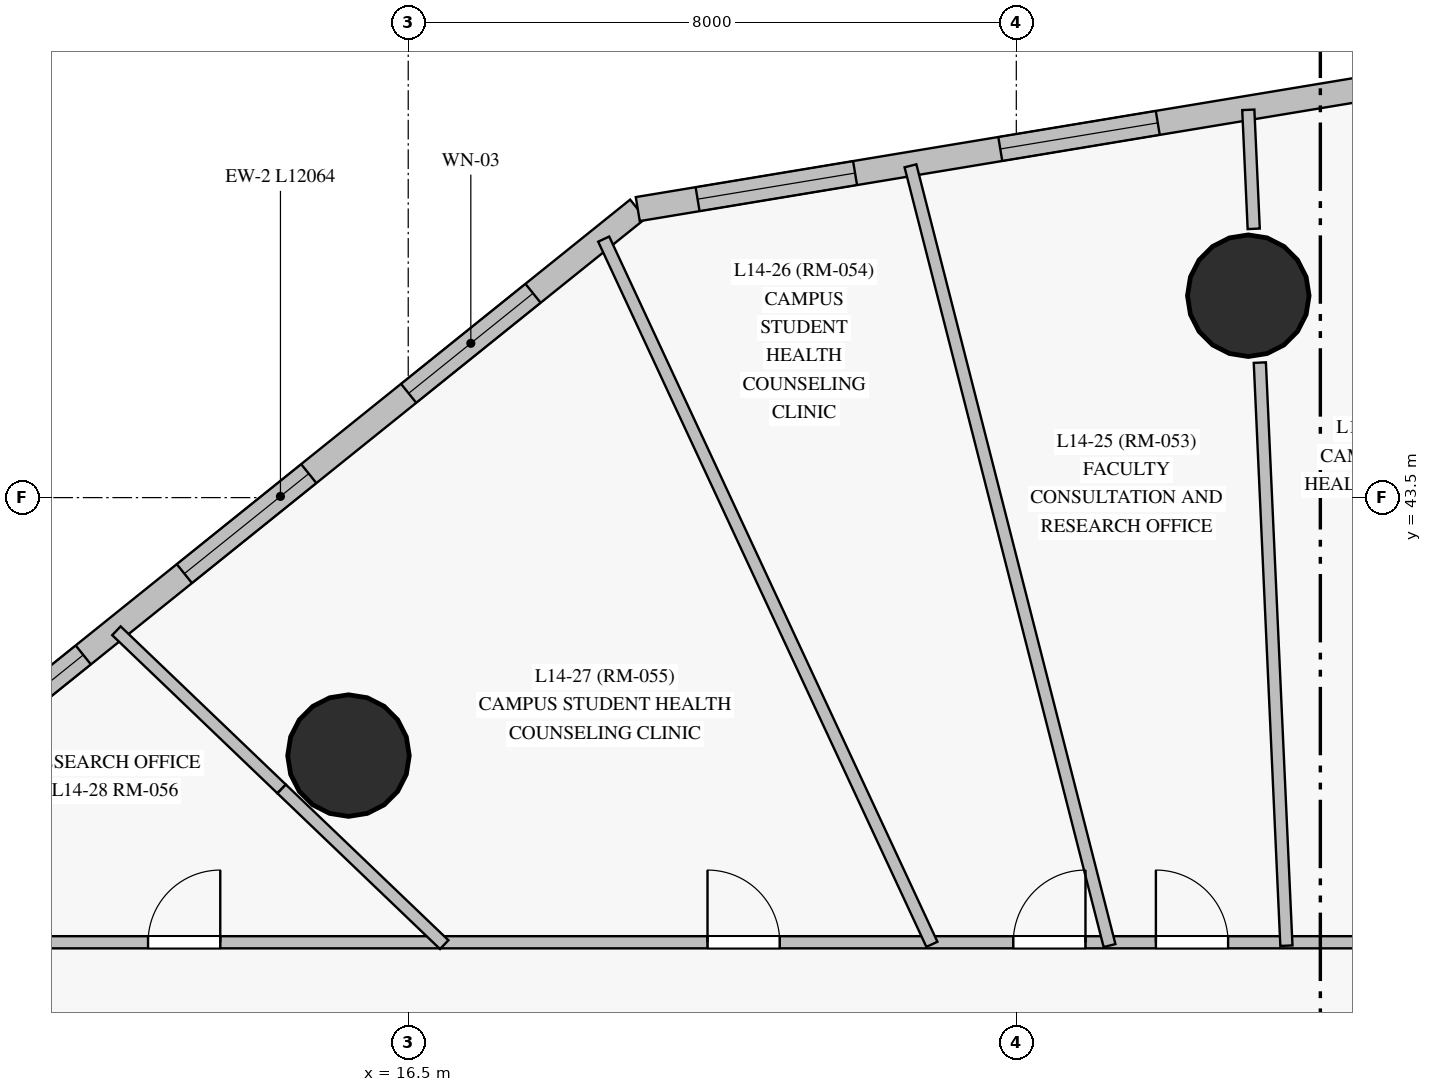
"""IFC4 building model, lengths in metres.
Left out: names, types, materials, properties, quantities, classifications, styles, units other than length and angle.
Written with IfcOpenShell. Run it as: python <this file> out.ifc"""

import sys

from ifc_helpers import new_model, si_unit, direction, frame, frame_2d, origin, origin_with_axes, origin_2d, place, context, subcontext, project, spatial, rectangle, circle, extrude, source, transform, mapped, element, fill, save


model = new_model("IFC4")
c1 = context("Model", 3, precision=1e-05, world=origin(), true_north=direction((0.0, 1.0)))
c2 = subcontext(c1, "Body", "Model", "MODEL_VIEW")
j1 = project(units=[si_unit("LENGTHUNIT", "METRE"), si_unit("PLANEANGLEUNIT", "RADIAN")], contexts=[c1])
p1 = place(None, origin())
s1 = spatial("IfcSite", under=j1, at=p1, CompositionType="ELEMENT")
p2 = place(p1, origin())
s2 = spatial("IfcBuilding", under=s1, at=p2, CompositionType="ELEMENT")
p3 = place(p2, frame((0.0, 0.0, 55.3)))
s3 = spatial("IfcBuildingStorey", under=s2, at=p3, CompositionType="ELEMENT", Elevation=55.3)
m1 = source(origin_with_axes(), c2, "Body", "SweptSolid", [
    extrude(circle(Radius=0.8, at=origin_2d()), origin(), (0.0, 0.0, 1.0), 3.6),
])
for number, where, z_axis, x_axis in (
    (1, (27.552, 46.156, 0.0), (0.0, 0.0, 1.0), (1.0, 0.0, 0.0)),
    (2, (15.714, 40.106, 0.0), (0.0, 0.0, 1.0), (1.0, 0.0, 0.0)),
):
    element("IfcColumn", number, at=place(p3, frame(where, z_axis=z_axis, x_axis=x_axis)), inside=s3, PredefinedType="COLUMN", context=c2, shape_type="MappedRepresentation", body=[
        mapped(m1, transform((0.0, 0.0, 0.0), scale=1.0)),
    ])
p4 = place(p3, frame((19.52, 47.296, 0.0), z_axis=(0.0, 0.0, 1.0), x_axis=(-0.779334397084, -0.626608248846, 0.0)))
e3 = element("IfcWall", 3, at=p4, inside=s3, PredefinedType="SOLIDWALL", context=c2, shape_type="SweptSolid", body=[
    extrude(rectangle(XDim=12.064, YDim=0.32, at=frame_2d((6.032, 0.0))), origin(), (0.0, 0.0, 1.0), 3.35),
])
p5 = place(p4, frame((1.768, 0.0, 0.85)))
e4 = element("IfcOpeningElement", 4, at=p5, cuts=e3, PredefinedType="OPENING", context=c2, shape_type="SweptSolid", body=[
    extrude(rectangle(XDim=2.1, YDim=1.95, at=frame_2d((1.05, 0.975))), frame((0.0, 0.17, 0.0), z_axis=(0.0, -1.0, 0.0), x_axis=(1.0, 0.0, 0.0)), (0.0, 0.0, 1.0), 0.34),
])
p6 = place(p4, frame((5.554, 0.0, 0.85)))
e5 = element("IfcOpeningElement", 5, at=p6, cuts=e3, PredefinedType="OPENING", context=c2, shape_type="SweptSolid", body=[
    extrude(rectangle(XDim=2.1, YDim=1.95, at=frame_2d((1.05, 0.975))), frame((0.0, 0.17, 0.0), z_axis=(0.0, -1.0, 0.0), x_axis=(1.0, 0.0, 0.0)), (0.0, 0.0, 1.0), 0.34),
])
p7 = place(p4, frame((9.361, 0.0, 0.85)))
e6 = element("IfcOpeningElement", 6, at=p7, cuts=e3, PredefinedType="OPENING", context=c2, shape_type="SweptSolid", body=[
    extrude(rectangle(XDim=2.1, YDim=1.95, at=frame_2d((1.05, 0.975))), frame((0.0, 0.17, 0.0), z_axis=(0.0, -1.0, 0.0), x_axis=(1.0, 0.0, 0.0)), (0.0, 0.0, 1.0), 0.34),
])
p8 = place(p3, frame((34.342, 49.753, 0.0), z_axis=(0.0, 0.0, 1.0), x_axis=(-0.986534972803, -0.163550443096, 0.0)))
e7 = element("IfcWall", 7, at=p8, inside=s3, PredefinedType="SOLIDWALL", context=c2, shape_type="SweptSolid", body=[
    extrude(rectangle(XDim=15.025, YDim=0.32, at=frame_2d((7.512, 0.0))), origin(), (0.0, 0.0, 1.0), 3.35),
])
p9 = place(p8, frame((3.28, 0.0, 0.85)))
e8 = element("IfcOpeningElement", 8, at=p9, cuts=e7, PredefinedType="OPENING", context=c2, shape_type="SweptSolid", body=[
    extrude(rectangle(XDim=2.1, YDim=1.95, at=frame_2d((1.05, 0.975))), frame((0.0, 0.17, 0.0), z_axis=(0.0, -1.0, 0.0), x_axis=(1.0, 0.0, 0.0)), (0.0, 0.0, 1.0), 0.34),
])
p10 = place(p8, frame((8.09, 0.0, 0.85)))
e9 = element("IfcOpeningElement", 9, at=p10, cuts=e7, PredefinedType="OPENING", context=c2, shape_type="SweptSolid", body=[
    extrude(rectangle(XDim=2.1, YDim=1.95, at=frame_2d((1.05, 0.975))), frame((0.0, 0.17, 0.0), z_axis=(0.0, -1.0, 0.0), x_axis=(1.0, 0.0, 0.0)), (0.0, 0.0, 1.0), 0.34),
])
p11 = place(p8, frame((12.127, 0.0, 0.85)))
e10 = element("IfcOpeningElement", 10, at=p11, cuts=e7, PredefinedType="OPENING", context=c2, shape_type="SweptSolid", body=[
    extrude(rectangle(XDim=2.1, YDim=1.95, at=frame_2d((1.05, 0.975))), frame((0.0, 0.17, 0.0), z_axis=(0.0, -1.0, 0.0), x_axis=(1.0, 0.0, 0.0)), (0.0, 0.0, 1.0), 0.34),
])
p12 = place(p3, frame((10.5, 37.65, 0.0), z_axis=(0.0, 0.0, 1.0), x_axis=(1.0, 0.0, 0.0)))
e11 = element("IfcWall", 11, at=p12, inside=s3, PredefinedType="PARTITIONING", context=c2, shape_type="SweptSolid", body=[
    extrude(rectangle(XDim=29.75, YDim=0.16, at=frame_2d((14.875, 0.0))), origin(), (0.0, 0.0, 1.0), 2.75),
])
p13 = place(p12, frame((26.502, 0.0, 0.0)))
e12 = element("IfcOpeningElement", 12, at=p13, cuts=e11, PredefinedType="OPENING", context=c2, shape_type="SweptSolid", body=[
    extrude(rectangle(XDim=0.95, YDim=2.15, at=frame_2d((0.475, 1.075))), frame((0.0, 0.09, 0.0), z_axis=(0.0, -1.0, 0.0), x_axis=(1.0, 0.0, 0.0)), (0.0, 0.0, 1.0), 0.18),
])
p14 = place(p12, frame((24.014, 0.0, 0.0)))
e13 = element("IfcOpeningElement", 13, at=p14, cuts=e11, PredefinedType="OPENING", context=c2, shape_type="SweptSolid", body=[
    extrude(rectangle(XDim=0.95, YDim=2.15, at=frame_2d((0.475, 1.075))), frame((0.0, 0.09, 0.0), z_axis=(0.0, -1.0, 0.0), x_axis=(1.0, 0.0, 0.0)), (0.0, 0.0, 1.0), 0.18),
])
p15 = place(p12, frame((21.837, 0.0, 0.0)))
e14 = element("IfcOpeningElement", 14, at=p15, cuts=e11, PredefinedType="OPENING", context=c2, shape_type="SweptSolid", body=[
    extrude(rectangle(XDim=0.95, YDim=2.15, at=frame_2d((0.475, 1.075))), frame((0.0, 0.09, 0.0), z_axis=(0.0, -1.0, 0.0), x_axis=(1.0, 0.0, 0.0)), (0.0, 0.0, 1.0), 0.18),
])
p16 = place(p12, frame((18.823, 0.0, 0.0)))
e15 = element("IfcOpeningElement", 15, at=p16, cuts=e11, PredefinedType="OPENING", context=c2, shape_type="SweptSolid", body=[
    extrude(rectangle(XDim=0.95, YDim=2.15, at=frame_2d((0.475, 1.075))), frame((0.0, 0.09, 0.0), z_axis=(0.0, -1.0, 0.0), x_axis=(1.0, 0.0, 0.0)), (0.0, 0.0, 1.0), 0.18),
])
p17 = place(p12, frame((15.836, 0.0, 0.0)))
e16 = element("IfcOpeningElement", 16, at=p17, cuts=e11, PredefinedType="OPENING", context=c2, shape_type="SweptSolid", body=[
    extrude(rectangle(XDim=0.95, YDim=2.15, at=frame_2d((0.475, 1.075))), frame((0.0, 0.09, 0.0), z_axis=(0.0, -1.0, 0.0), x_axis=(1.0, 0.0, 0.0)), (0.0, 0.0, 1.0), 0.18),
])
p18 = place(p12, frame((13.96, 0.0, 0.0)))
e17 = element("IfcOpeningElement", 17, at=p18, cuts=e11, PredefinedType="OPENING", context=c2, shape_type="SweptSolid", body=[
    extrude(rectangle(XDim=0.95, YDim=2.15, at=frame_2d((0.475, 1.075))), frame((0.0, 0.09, 0.0), z_axis=(0.0, -1.0, 0.0), x_axis=(1.0, 0.0, 0.0)), (0.0, 0.0, 1.0), 0.18),
])
p19 = place(p12, frame((9.938, 0.0, 0.0)))
e18 = element("IfcOpeningElement", 18, at=p19, cuts=e11, PredefinedType="OPENING", context=c2, shape_type="SweptSolid", body=[
    extrude(rectangle(XDim=0.95, YDim=2.15, at=frame_2d((0.475, 1.075))), frame((0.0, 0.09, 0.0), z_axis=(0.0, -1.0, 0.0), x_axis=(1.0, 0.0, 0.0)), (0.0, 0.0, 1.0), 0.18),
])
p20 = place(p12, frame((2.577, 0.0, 0.0)))
e19 = element("IfcOpeningElement", 19, at=p20, cuts=e11, PredefinedType="OPENING", context=c2, shape_type="SweptSolid", body=[
    extrude(rectangle(XDim=0.95, YDim=2.15, at=frame_2d((0.475, 1.075))), frame((0.0, 0.09, 0.0), z_axis=(0.0, -1.0, 0.0), x_axis=(1.0, 0.0, 0.0)), (0.0, 0.0, 1.0), 0.18),
])
p21 = place(p3, frame((25.727, 37.606, 0.0), z_axis=(0.0, 0.0, 1.0), x_axis=(-0.247377718141, 0.968919121789, 0.0)))
e20 = element("IfcWall", 20, at=p21, inside=s3, PredefinedType="PARTITIONING", context=c2, shape_type="SweptSolid", body=[
    extrude(rectangle(XDim=10.588, YDim=0.16, at=frame_2d((5.294, 0.0))), origin(), (0.0, 0.0, 1.0), 3.35),
])
p22 = place(p3, frame((23.39, 37.623, 0.0), z_axis=(0.0, 0.0, 1.0), x_axis=(-0.421939651392, 0.906623919044, 0.0)))
e21 = element("IfcWall", 21, at=p22, inside=s3, PredefinedType="PARTITIONING", context=c2, shape_type="SweptSolid", body=[
    extrude(rectangle(XDim=10.233, YDim=0.16, at=frame_2d((5.117, 0.0))), origin(), (0.0, 0.0, 1.0), 3.35),
])
p23 = place(p3, frame((28.054, 37.605, 0.0), z_axis=(0.0, 0.0, 1.0), x_axis=(-0.045560532903, 0.998961579763, 0.0)))
e22 = element("IfcWall", 22, at=p23, inside=s3, PredefinedType="PARTITIONING", context=c2, shape_type="SweptSolid", body=[
    extrude(rectangle(XDim=7.679, YDim=0.16, at=frame_2d((3.839, 0.0))), origin(), (0.0, 0.0, 1.0), 2.7),
])
p24 = place(p3, frame((14.834, 39.667, 0.0), z_axis=(0.0, 0.0, 1.0), x_axis=(-0.722317497453, 0.691561590079, 0.0)))
e23 = element("IfcWall", 23, at=p24, inside=s3, PredefinedType="PARTITIONING", context=c2, shape_type="SweptSolid", body=[
    extrude(rectangle(XDim=3.009, YDim=0.16, at=frame_2d((1.504, 0.0))), origin(), (0.0, 0.0, 1.0), 3.35),
])
p25 = place(p3, frame((16.974, 37.619, 0.0), z_axis=(0.0, 0.0, 1.0), x_axis=(-0.722274713214, 0.691606274301, 0.0)))
e24 = element("IfcWall", 24, at=p25, inside=s3, PredefinedType="PARTITIONING", context=c2, shape_type="SweptSolid", body=[
    extrude(rectangle(XDim=2.961, YDim=0.16, at=frame_2d((1.481, 0.0))), origin(), (0.0, 0.0, 1.0), 2.7),
])
p26 = place(p3, frame((27.624, 47.036, 0.0), z_axis=(0.0, 0.0, 1.0), x_axis=(-0.045640834064, 0.998957914162, 0.0)))
e25 = element("IfcWall", 25, at=p26, inside=s3, PredefinedType="PARTITIONING", context=c2, shape_type="SweptSolid", body=[
    extrude(rectangle(XDim=1.567, YDim=0.16, at=frame_2d((0.784, 0.0))), origin(), (0.0, 0.0, 1.0), 3.35),
])
m2 = source(origin_with_axes(), c2, "Body", "SweptSolid", [
    extrude(rectangle(XDim=2.1, YDim=1.95, at=frame_2d((1.05, 0.975))), frame((0.0, 0.03, 0.0), z_axis=(0.0, -1.0, 0.0), x_axis=(1.0, 0.0, 0.0)), (0.0, 0.0, 1.0), 0.06),
])
p27 = place(p5, origin())
e26 = element("IfcWindow", 26, at=p27, inside=s3, PartitioningType="SINGLE_PANEL", PredefinedType="WINDOW", context=c2, shape_type="MappedRepresentation", body=[
    mapped(m2, transform((0.0, 0.0, 0.0), scale=1.0)),
])
fill(e4, e26)
p28 = place(p6, origin())
e27 = element("IfcWindow", 27, at=p28, inside=s3, PartitioningType="SINGLE_PANEL", PredefinedType="WINDOW", context=c2, shape_type="MappedRepresentation", body=[
    mapped(m2, transform((0.0, 0.0, 0.0), scale=1.0)),
])
fill(e5, e27)
p29 = place(p7, origin())
e28 = element("IfcWindow", 28, at=p29, inside=s3, PartitioningType="SINGLE_PANEL", PredefinedType="WINDOW", context=c2, shape_type="MappedRepresentation", body=[
    mapped(m2, transform((0.0, 0.0, 0.0), scale=1.0)),
])
fill(e6, e28)
p30 = place(p10, origin())
e29 = element("IfcWindow", 29, at=p30, inside=s3, PartitioningType="SINGLE_PANEL", PredefinedType="WINDOW", context=c2, shape_type="MappedRepresentation", body=[
    mapped(m2, transform((0.0, 0.0, 0.0), scale=1.0)),
])
fill(e9, e29)
p31 = place(p11, origin())
e30 = element("IfcWindow", 30, at=p31, inside=s3, PartitioningType="SINGLE_PANEL", PredefinedType="WINDOW", context=c2, shape_type="MappedRepresentation", body=[
    mapped(m2, transform((0.0, 0.0, 0.0), scale=1.0)),
])
fill(e10, e30)
m3 = source(origin_with_axes(), c2, "Body", "SweptSolid", [
    extrude(rectangle(XDim=0.95, YDim=2.15, at=frame_2d((0.475, 1.075))), frame((0.0, 0.025, 0.0), z_axis=(0.0, -1.0, 0.0), x_axis=(1.0, 0.0, 0.0)), (0.0, 0.0, 1.0), 0.05),
])
p32 = place(p17, origin())
e31 = element("IfcDoor", 31, at=p32, inside=s3, OperationType="SINGLE_SWING_LEFT", PredefinedType="DOOR", context=c2, shape_type="MappedRepresentation", body=[
    mapped(m3, transform((0.0, 0.0, 0.0), scale=1.0)),
])
fill(e16, e31)
p33 = place(p18, origin())
e32 = element("IfcDoor", 32, at=p33, inside=s3, OperationType="SINGLE_SWING_RIGHT", PredefinedType="DOOR", context=c2, shape_type="MappedRepresentation", body=[
    mapped(m3, transform((0.0, 0.0, 0.0), scale=1.0)),
])
fill(e17, e32)
p34 = place(p19, origin())
e33 = element("IfcDoor", 33, at=p34, inside=s3, OperationType="SINGLE_SWING_LEFT", PredefinedType="DOOR", context=c2, shape_type="MappedRepresentation", body=[
    mapped(m3, transform((0.0, 0.0, 0.0), scale=1.0)),
])
fill(e18, e33)
p35 = place(p20, origin())
e34 = element("IfcDoor", 34, at=p35, inside=s3, OperationType="SINGLE_SWING_RIGHT", PredefinedType="DOOR", context=c2, shape_type="MappedRepresentation", body=[
    mapped(m3, transform((0.0, 0.0, 0.0), scale=1.0)),
])
fill(e19, e34)
save(model, sys.argv[1])
